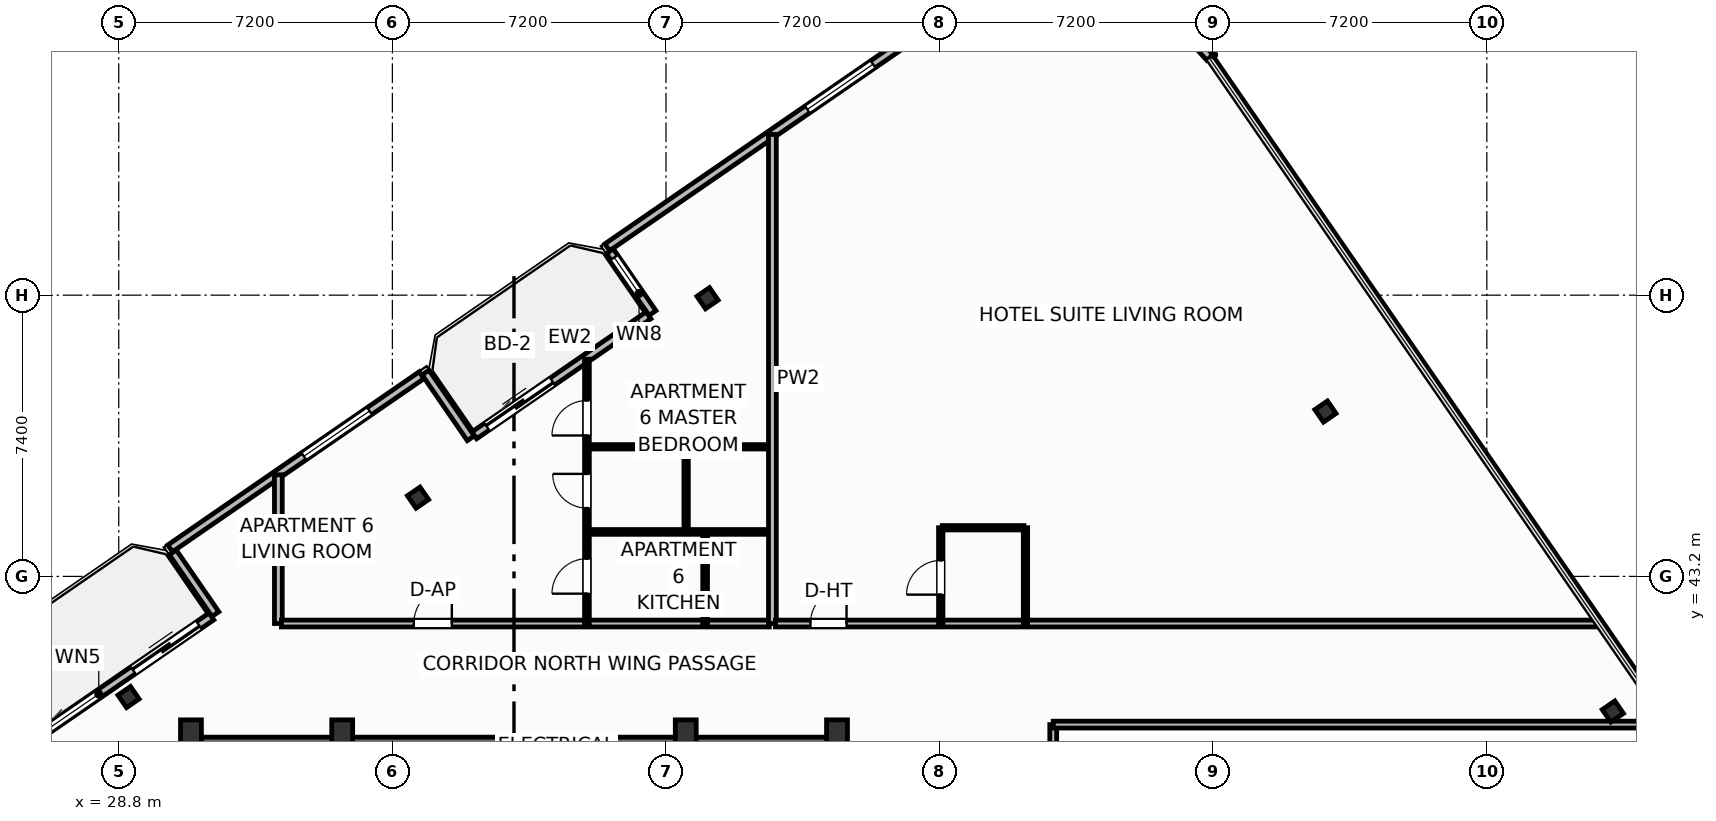
"""IFC4 building model, lengths in metres.
Left out: names, types, materials, properties, quantities, classifications, styles, units other than length and angle.
Written with IfcOpenShell. Run it as: python <this file> out.ifc"""

import sys

from ifc_helpers import new_model, si_unit, direction, frame, frame_2d, origin, origin_2d, place, context, subcontext, project, spatial, rectangle, i_section, extrude, element, fill, save


model = new_model("IFC4")
c1 = context("Model", 3, precision=1e-05, world=origin(), true_north=direction((0.0, 1.0)))
c2 = subcontext(c1, "Body", "Model", "MODEL_VIEW")
j1 = project(units=[si_unit("LENGTHUNIT", "METRE"), si_unit("PLANEANGLEUNIT", "RADIAN")], contexts=[c1])
p1 = place(None, origin())
s1 = spatial("IfcSite", under=j1, at=p1, CompositionType="ELEMENT")
p2 = place(p1, origin())
s2 = spatial("IfcBuilding", under=s1, at=p2, CompositionType="ELEMENT")
p3 = place(p2, frame((0.0, 0.0, 269.3)))
s3 = spatial("IfcBuildingStorey", under=s2, at=p3, CompositionType="ELEMENT", Elevation=269.3)
for number, where, z_axis, x_axis in (
    (1, (30.7, 39.05, 0.0), (0.0, 0.0, 1.0), (1.0, 0.0, 0.0)),
    (2, (34.68, 39.05, 0.0), (0.0, 0.0, 1.0), (1.0, 0.0, 0.0)),
    (3, (43.72, 39.05, 0.0), (0.0, 0.0, 1.0), (1.0, 0.0, 0.0)),
    (4, (47.7, 39.05, 0.0), (0.0, 0.0, 1.0), (1.0, 0.0, 0.0)),
):
    element("IfcColumn", number, at=place(p3, frame(where, z_axis=z_axis, x_axis=x_axis)), inside=s3, PredefinedType="COLUMN", context=c2, shape_type="SweptSolid", body=[
        extrude(rectangle(XDim=0.55, YDim=0.75, at=origin_2d()), origin(), (0.0, 0.0, 1.0), 3.7),
    ])
p4 = place(p3, frame((30.58, 38.695, 0.0), z_axis=(0.0, 0.0, 1.0), x_axis=(1.0, 0.0, 0.0)))
e5 = element("IfcWall", 5, at=p4, inside=s3, PredefinedType="SHEAR", context=c2, shape_type="SweptSolid", body=[
    extrude(rectangle(XDim=17.24, YDim=0.55, at=frame_2d((8.62, 0.0))), origin(), (0.0, 0.0, 1.0), 3.45),
])
for number, where, z_axis, x_axis in (
    (6, (68.115, 39.644, 0.0), (0.0, 0.0, 1.0), (0.824, 0.567, 0.0)),
    (7, (60.554, 47.537, 0.0), (0.0, 0.0, 1.0), (0.824, 0.567, 0.0)),
    (8, (44.292, 50.519, 0.0), (0.0, 0.0, 1.0), (0.824, 0.567, 0.0)),
    (9, (36.675, 45.272, 0.0), (0.0, 0.0, 1.0), (0.824, 0.567, 0.0)),
    (10, (29.057, 40.025, 0.0), (0.0, 0.0, 1.0), (0.824, 0.567, 0.0)),
):
    element("IfcColumn", number, at=place(p3, frame(where, z_axis=z_axis, x_axis=x_axis)), inside=s3, PredefinedType="COLUMN", context=c2, shape_type="SweptSolid", body=[
        extrude(i_section(OverallWidth=0.401, OverallDepth=0.399, WebThickness=0.025, FlangeThickness=0.04, FilletRadius=0.022, at=origin_2d()), origin(), (0.0, 0.0, 1.0), 3.7),
    ])
p5 = place(p3, frame((26.297, 38.743, 0.0), z_axis=(0.0, 0.0, 1.0), x_axis=(0.823534636215, 0.567265989598, 0.0)))
e11 = element("IfcWall", 11, at=p5, inside=s3, PredefinedType="SOLIDWALL", context=c2, shape_type="SweptSolid", body=[
    extrude(rectangle(XDim=6.0, YDim=0.22, at=frame_2d((3.0, 0.0))), origin(), (0.0, 0.0, 1.0), 2.73),
])
p6 = place(p5, frame((3.5, 0.0, 0.0)))
e12 = element("IfcOpeningElement", 12, at=p6, cuts=e11, PredefinedType="OPENING", context=c2, shape_type="SweptSolid", body=[
    extrude(rectangle(XDim=2.1, YDim=2.3, at=frame_2d((1.05, 1.15))), frame((0.0, 0.12, 0.0), z_axis=(0.0, -1.0, 0.0), x_axis=(1.0, 0.0, 0.0)), (0.0, 0.0, 1.0), 0.24),
])
p7 = place(p5, frame((0.55, 0.0, 0.75)))
e13 = element("IfcOpeningElement", 13, at=p7, cuts=e11, PredefinedType="OPENING", context=c2, shape_type="SweptSolid", body=[
    extrude(rectangle(XDim=1.85, YDim=1.75, at=frame_2d((0.925, 0.875))), frame((0.0, 0.12, 0.0), z_axis=(0.0, -1.0, 0.0), x_axis=(1.0, 0.0, 0.0)), (0.0, 0.0, 1.0), 0.24),
])
p8 = place(p3, frame((38.156, 46.912, 0.0), z_axis=(0.0, 0.0, 1.0), x_axis=(0.823527178548, 0.567276816195, 0.0)))
e14 = element("IfcWall", 14, at=p8, inside=s3, PredefinedType="SOLIDWALL", context=c2, shape_type="SweptSolid", body=[
    extrude(rectangle(XDim=5.567, YDim=0.22, at=frame_2d((2.783, 0.0))), origin(), (0.0, 0.0, 1.0), 2.73),
])
p9 = place(p8, frame((0.4, 0.0, 0.0)))
e15 = element("IfcOpeningElement", 15, at=p9, cuts=e14, PredefinedType="OPENING", context=c2, shape_type="SweptSolid", body=[
    extrude(rectangle(XDim=2.1, YDim=2.3, at=frame_2d((1.05, 1.15))), frame((0.0, 0.12, 0.0), z_axis=(0.0, -1.0, 0.0), x_axis=(1.0, 0.0, 0.0)), (0.0, 0.0, 1.0), 0.24),
])
p10 = place(p3, frame((57.51, 56.855, 0.0), z_axis=(0.0, 0.0, 1.0), x_axis=(-0.669853727156, 0.742493086982, 0.0)))
e16 = element("IfcWall", 16, at=p10, inside=s3, PredefinedType="SOLIDWALL", context=c2, shape_type="SweptSolid", body=[
    extrude(rectangle(XDim=1.274, YDim=0.22, at=frame_2d((0.637, 0.0))), origin(), (0.0, 0.0, 1.0), 2.73),
])
p11 = place(p3, frame((50.697, 58.087, 0.0), z_axis=(0.0, 0.0, 1.0), x_axis=(-0.823539455464, -0.567258993137, 0.0)))
e17 = element("IfcWall", 17, at=p11, inside=s3, PredefinedType="SOLIDWALL", context=c2, shape_type="SweptSolid", body=[
    extrude(rectangle(XDim=10.98, YDim=0.22, at=frame_2d((5.49, 0.0))), origin(), (0.0, 0.0, 1.0), 2.73),
])
p12 = place(p11, frame((2.486, 0.0, 0.8)))
e18 = element("IfcOpeningElement", 18, at=p12, cuts=e17, PredefinedType="OPENING", context=c2, shape_type="SweptSolid", body=[
    extrude(rectangle(XDim=2.1, YDim=1.75, at=frame_2d((1.05, 0.875))), frame((0.0, 0.12, 0.0), z_axis=(0.0, -1.0, 0.0), x_axis=(1.0, 0.0, 0.0)), (0.0, 0.0, 1.0), 0.24),
])
p13 = place(p3, frame((41.725, 51.756, 0.0), z_axis=(0.0, 0.0, 1.0), x_axis=(0.567273565974, -0.823529417415, 0.0)))
e19 = element("IfcWall", 19, at=p13, inside=s3, PredefinedType="SOLIDWALL", context=c2, shape_type="SweptSolid", body=[
    extrude(rectangle(XDim=1.975, YDim=0.22, at=frame_2d((0.988, 0.0))), origin(), (0.0, 0.0, 1.0), 2.73),
])
p14 = place(p13, frame((0.2, 0.0, 0.8)))
e20 = element("IfcOpeningElement", 20, at=p14, cuts=e19, PredefinedType="OPENING", context=c2, shape_type="SweptSolid", body=[
    extrude(rectangle(XDim=1.15, YDim=1.4, at=frame_2d((0.575, 0.7))), frame((0.0, 0.12, 0.0), z_axis=(0.0, -1.0, 0.0), x_axis=(1.0, 0.0, 0.0)), (0.0, 0.0, 1.0), 0.24),
])
p15 = place(p3, frame((38.063, 46.835, 0.0), z_axis=(0.0, 0.0, 1.0), x_axis=(-0.567219383419, 0.823566737474, 0.0)))
e21 = element("IfcWall", 21, at=p15, inside=s3, PredefinedType="SOLIDWALL", context=c2, shape_type="SweptSolid", body=[
    extrude(rectangle(XDim=2.1, YDim=0.22, at=frame_2d((1.05, 0.0))), origin(), (0.0, 0.0, 1.0), 2.73),
])
p16 = place(p3, frame((36.769, 48.494, 0.0), z_axis=(0.0, 0.0, 1.0), x_axis=(-0.823521165086, -0.56728554596, 0.0)))
e22 = element("IfcWall", 22, at=p16, inside=s3, PredefinedType="SOLIDWALL", context=c2, shape_type="SweptSolid", body=[
    extrude(rectangle(XDim=8.035, YDim=0.22, at=frame_2d((4.018, 0.0))), origin(), (0.0, 0.0, 1.0), 2.73),
])
p17 = place(p16, frame((1.662, 0.0, 0.8)))
e23 = element("IfcOpeningElement", 23, at=p17, cuts=e22, PredefinedType="OPENING", context=c2, shape_type="SweptSolid", body=[
    extrude(rectangle(XDim=2.1, YDim=1.75, at=frame_2d((1.05, 0.875))), frame((0.0, 0.12, 0.0), z_axis=(0.0, -1.0, 0.0), x_axis=(1.0, 0.0, 0.0)), (0.0, 0.0, 1.0), 0.24),
])
p18 = place(p3, frame((30.223, 43.833, 0.0), z_axis=(0.0, 0.0, 1.0), x_axis=(0.567215821234, -0.823569190865, 0.0)))
e24 = element("IfcWall", 24, at=p18, inside=s3, PredefinedType="SOLIDWALL", context=c2, shape_type="SweptSolid", body=[
    extrude(rectangle(XDim=1.975, YDim=0.22, at=frame_2d((0.988, 0.0))), origin(), (0.0, 0.0, 1.0), 2.73),
])
p19 = place(p3, frame((33.0, 41.96, 0.0), z_axis=(0.0, 0.0, 1.0), x_axis=(0.0, 1.0, 0.0)))
e25 = element("IfcWall", 25, at=p19, inside=s3, PredefinedType="PARTITIONING", context=c2, shape_type="SweptSolid", body=[
    extrude(rectangle(XDim=3.914, YDim=0.205, at=frame_2d((1.957, 0.0))), origin(), (0.0, 0.0, 1.0), 3.45),
])
p20 = place(p3, frame((33.08, 41.96, 0.0), z_axis=(0.0, 0.0, 1.0), x_axis=(1.0, 0.0, 0.0)))
e26 = element("IfcWall", 26, at=p20, inside=s3, PredefinedType="PARTITIONING", context=c2, shape_type="SweptSolid", body=[
    extrude(rectangle(XDim=12.84, YDim=0.18, at=frame_2d((6.42, 0.0))), origin(), (0.0, 0.0, 1.0), 3.45),
])
p21 = place(p20, frame((3.485, 0.0, 0.0)))
e27 = element("IfcOpeningElement", 27, at=p21, cuts=e26, PredefinedType="OPENING", context=c2, shape_type="SweptSolid", body=[
    extrude(rectangle(XDim=1.0, YDim=2.2, at=frame_2d((0.5, 1.1))), frame((0.0, 0.1, 0.0), z_axis=(0.0, -1.0, 0.0), x_axis=(1.0, 0.0, 0.0)), (0.0, 0.0, 1.0), 0.2),
])
p22 = place(p3, frame((41.12, 41.96, 0.0), z_axis=(0.0, 0.0, 1.0), x_axis=(0.0, 1.0, 0.0)))
e28 = element("IfcWall", 28, at=p22, inside=s3, PredefinedType="PARTITIONING", context=c2, shape_type="SweptSolid", body=[
    extrude(rectangle(XDim=6.957, YDim=0.125, at=frame_2d((3.479, 0.0))), origin(), (0.0, 0.0, 1.0), 3.45),
])
p23 = place(p22, frame((0.785, 0.0, 0.0)))
e29 = element("IfcOpeningElement", 29, at=p23, cuts=e28, PredefinedType="OPENING", context=c2, shape_type="SweptSolid", body=[
    extrude(rectangle(XDim=0.92, YDim=2.05, at=frame_2d((0.46, 1.025))), frame((0.0, 0.073, 0.0), z_axis=(0.0, -1.0, 0.0), x_axis=(1.0, 0.0, 0.0)), (0.0, 0.0, 1.0), 0.145),
])
p24 = place(p22, frame((3.037, 0.0, 0.0)))
e30 = element("IfcOpeningElement", 30, at=p24, cuts=e28, PredefinedType="OPENING", context=c2, shape_type="SweptSolid", body=[
    extrude(rectangle(XDim=0.9, YDim=2.05, at=frame_2d((0.45, 1.025))), frame((0.0, 0.073, 0.0), z_axis=(0.0, -1.0, 0.0), x_axis=(1.0, 0.0, 0.0)), (0.0, 0.0, 1.0), 0.145),
])
p25 = place(p22, frame((4.948, 0.0, 0.0)))
e31 = element("IfcOpeningElement", 31, at=p25, cuts=e28, PredefinedType="OPENING", context=c2, shape_type="SweptSolid", body=[
    extrude(rectangle(XDim=0.92, YDim=2.05, at=frame_2d((0.46, 1.025))), frame((0.0, 0.073, 0.0), z_axis=(0.0, -1.0, 0.0), x_axis=(1.0, 0.0, 0.0)), (0.0, 0.0, 1.0), 0.145),
])
p26 = place(p3, frame((41.19, 44.37, 0.0), z_axis=(0.0, 0.0, 1.0), x_axis=(1.0, 0.0, 0.0)))
e32 = element("IfcWall", 32, at=p26, inside=s3, PredefinedType="PARTITIONING", context=c2, shape_type="SweptSolid", body=[
    extrude(rectangle(XDim=4.73, YDim=0.125, at=frame_2d((2.365, 0.0))), origin(), (0.0, 0.0, 1.0), 3.45),
])
p27 = place(p3, frame((41.19, 46.61, 0.0), z_axis=(0.0, 0.0, 1.0), x_axis=(1.0, 0.0, 0.0)))
e33 = element("IfcWall", 33, at=p27, inside=s3, PredefinedType="PARTITIONING", context=c2, shape_type="SweptSolid", body=[
    extrude(rectangle(XDim=4.73, YDim=0.115, at=frame_2d((2.365, 0.0))), origin(), (0.0, 0.0, 1.0), 3.45),
])
p28 = place(p3, frame((44.23, 41.96, 0.0), z_axis=(0.0, 0.0, 1.0), x_axis=(0.0, 1.0, 0.0)))
e34 = element("IfcWall", 34, at=p28, inside=s3, PredefinedType="PARTITIONING", context=c2, shape_type="SweptSolid", body=[
    extrude(rectangle(XDim=2.41, YDim=0.125, at=frame_2d((1.205, 0.0))), origin(), (0.0, 0.0, 1.0), 3.45),
])
p29 = place(p3, frame((43.73, 44.37, 0.0), z_axis=(0.0, 0.0, 1.0), x_axis=(0.0, 1.0, 0.0)))
e35 = element("IfcWall", 35, at=p29, inside=s3, PredefinedType="PARTITIONING", context=c2, shape_type="SweptSolid", body=[
    extrude(rectangle(XDim=2.24, YDim=0.115, at=frame_2d((1.12, 0.0))), origin(), (0.0, 0.0, 1.0), 3.45),
])
p30 = place(p3, frame((46.0, 41.96, 0.0), z_axis=(0.0, 0.0, 1.0), x_axis=(0.0, 1.0, 0.0)))
e36 = element("IfcWall", 36, at=p30, inside=s3, PredefinedType="PARTITIONING", context=c2, shape_type="SweptSolid", body=[
    extrude(rectangle(XDim=12.868, YDim=0.205, at=frame_2d((6.434, 0.0))), origin(), (0.0, 0.0, 1.0), 3.45),
])
p31 = place(p3, frame((46.08, 41.96, 0.0), z_axis=(0.0, 0.0, 1.0), x_axis=(1.0, 0.0, 0.0)))
e37 = element("IfcWall", 37, at=p31, inside=s3, PredefinedType="PARTITIONING", context=c2, shape_type="SweptSolid", body=[
    extrude(rectangle(XDim=21.627, YDim=0.18, at=frame_2d((10.813, 0.0))), origin(), (0.0, 0.0, 1.0), 3.45),
])
p32 = place(p31, frame((0.921, 0.0, 0.0)))
e38 = element("IfcOpeningElement", 38, at=p32, cuts=e37, PredefinedType="OPENING", context=c2, shape_type="SweptSolid", body=[
    extrude(rectangle(XDim=0.95, YDim=2.15, at=frame_2d((0.475, 1.075))), frame((0.0, 0.1, 0.0), z_axis=(0.0, -1.0, 0.0), x_axis=(1.0, 0.0, 0.0)), (0.0, 0.0, 1.0), 0.2),
])
p33 = place(p3, frame((50.47, 44.48, 0.0), z_axis=(0.0, 0.0, 1.0), x_axis=(1.0, 0.0, 0.0)))
e39 = element("IfcWall", 39, at=p33, inside=s3, PredefinedType="PARTITIONING", context=c2, shape_type="SweptSolid", body=[
    extrude(rectangle(XDim=2.15, YDim=0.115, at=frame_2d((1.075, 0.0))), origin(), (0.0, 0.0, 1.0), 3.018),
])
p34 = place(p3, frame((50.43, 41.96, 0.0), z_axis=(0.0, 0.0, 1.0), x_axis=(0.0, 1.0, 0.0)))
e40 = element("IfcWall", 40, at=p34, inside=s3, PredefinedType="PARTITIONING", context=c2, shape_type="SweptSolid", body=[
    extrude(rectangle(XDim=2.52, YDim=0.115, at=frame_2d((1.26, 0.0))), origin(), (0.0, 0.0, 1.0), 3.45),
])
p35 = place(p34, frame((0.76, 0.0, 0.0)))
e41 = element("IfcOpeningElement", 41, at=p35, cuts=e40, PredefinedType="OPENING", context=c2, shape_type="SweptSolid", body=[
    extrude(rectangle(XDim=0.9, YDim=2.05, at=frame_2d((0.45, 1.025))), frame((0.0, 0.067, 0.0), z_axis=(0.0, -1.0, 0.0), x_axis=(1.0, 0.0, 0.0)), (0.0, 0.0, 1.0), 0.135),
])
p36 = place(p3, frame((52.66, 41.96, 0.0), z_axis=(0.0, 0.0, 1.0), x_axis=(0.0, 1.0, 0.0)))
e42 = element("IfcWall", 42, at=p36, inside=s3, PredefinedType="PARTITIONING", context=c2, shape_type="SweptSolid", body=[
    extrude(rectangle(XDim=2.52, YDim=0.115, at=frame_2d((1.26, 0.0))), origin(), (0.0, 0.0, 1.0), 3.45),
])
p37 = place(p3, frame((53.39, 26.84, 0.0), z_axis=(0.0, 0.0, 1.0), x_axis=(0.0, 1.0, 0.0)))
e43 = element("IfcWall", 43, at=p37, inside=s3, PredefinedType="PARTITIONING", context=c2, shape_type="SweptSolid", body=[
    extrude(rectangle(XDim=12.46, YDim=0.18, at=frame_2d((6.23, 0.0))), origin(), (0.0, 0.0, 1.0), 3.45),
])
p38 = place(p37, frame((0.618, 0.0, 0.0)))
e44 = element("IfcOpeningElement", 44, at=p38, cuts=e43, PredefinedType="OPENING", context=c2, shape_type="SweptSolid", body=[
    extrude(rectangle(XDim=0.92, YDim=2.05, at=frame_2d((0.46, 1.025))), frame((0.0, 0.1, 0.0), z_axis=(0.0, -1.0, 0.0), x_axis=(1.0, 0.0, 0.0)), (0.0, 0.0, 1.0), 0.2),
])
p39 = place(p3, frame((53.39, 39.3, 0.0), z_axis=(0.0, 0.0, 1.0), x_axis=(1.0, 0.0, 0.0)))
e45 = element("IfcWall", 45, at=p39, inside=s3, PredefinedType="PARTITIONING", context=c2, shape_type="SweptSolid", body=[
    extrude(rectangle(XDim=16.149, YDim=0.18, at=frame_2d((8.075, 0.0))), origin(), (0.0, 0.0, 1.0), 2.739),
])
p40 = place(p6, origin())
e46 = element("IfcDoor", 46, at=p40, inside=s3, OperationType="SLIDING_TO_LEFT", PredefinedType="DOOR", context=c2, shape_type="SweptSolid", body=[
    extrude(rectangle(XDim=2.1, YDim=2.3, at=frame_2d((1.05, 1.15))), frame((0.0, 0.025, 0.0), z_axis=(0.0, -1.0, 0.0), x_axis=(1.0, 0.0, 0.0)), (0.0, 0.0, 1.0), 0.05),
])
fill(e12, e46)
p41 = place(p7, origin())
e47 = element("IfcWindow", 47, at=p41, inside=s3, PartitioningType="SINGLE_PANEL", PredefinedType="WINDOW", context=c2, shape_type="SweptSolid", body=[
    extrude(rectangle(XDim=1.85, YDim=1.75, at=frame_2d((0.925, 0.875))), frame((0.0, 0.03, 0.0), z_axis=(0.0, -1.0, 0.0), x_axis=(1.0, 0.0, 0.0)), (0.0, 0.0, 1.0), 0.06),
])
fill(e13, e47)
p42 = place(p9, origin())
e48 = element("IfcDoor", 48, at=p42, inside=s3, OperationType="SLIDING_TO_LEFT", PredefinedType="DOOR", context=c2, shape_type="SweptSolid", body=[
    extrude(rectangle(XDim=2.1, YDim=2.3, at=frame_2d((1.05, 1.15))), frame((0.0, 0.025, 0.0), z_axis=(0.0, -1.0, 0.0), x_axis=(1.0, 0.0, 0.0)), (0.0, 0.0, 1.0), 0.05),
])
fill(e15, e48)
p43 = place(p12, origin())
e49 = element("IfcWindow", 49, at=p43, inside=s3, PartitioningType="SINGLE_PANEL", PredefinedType="WINDOW", context=c2, shape_type="SweptSolid", body=[
    extrude(rectangle(XDim=2.1, YDim=1.75, at=frame_2d((1.05, 0.875))), frame((0.0, 0.03, 0.0), z_axis=(0.0, -1.0, 0.0), x_axis=(1.0, 0.0, 0.0)), (0.0, 0.0, 1.0), 0.06),
])
fill(e18, e49)
p44 = place(p17, origin())
e50 = element("IfcWindow", 50, at=p44, inside=s3, PartitioningType="SINGLE_PANEL", PredefinedType="WINDOW", context=c2, shape_type="SweptSolid", body=[
    extrude(rectangle(XDim=2.1, YDim=1.75, at=frame_2d((1.05, 0.875))), frame((0.0, 0.03, 0.0), z_axis=(0.0, -1.0, 0.0), x_axis=(1.0, 0.0, 0.0)), (0.0, 0.0, 1.0), 0.06),
])
fill(e23, e50)
p45 = place(p21, origin())
e51 = element("IfcDoor", 51, at=p45, inside=s3, OperationType="SINGLE_SWING_RIGHT", PredefinedType="DOOR", context=c2, shape_type="SweptSolid", body=[
    extrude(rectangle(XDim=1.0, YDim=2.2, at=frame_2d((0.5, 1.1))), frame((0.0, 0.025, 0.0), z_axis=(0.0, -1.0, 0.0), x_axis=(1.0, 0.0, 0.0)), (0.0, 0.0, 1.0), 0.05),
])
fill(e27, e51)
p46 = place(p23, origin())
e52 = element("IfcDoor", 52, at=p46, inside=s3, OperationType="SINGLE_SWING_LEFT", PredefinedType="DOOR", context=c2, shape_type="SweptSolid", body=[
    extrude(rectangle(XDim=0.92, YDim=2.05, at=frame_2d((0.46, 1.025))), frame((0.0, 0.025, 0.0), z_axis=(0.0, -1.0, 0.0), x_axis=(1.0, 0.0, 0.0)), (0.0, 0.0, 1.0), 0.05),
])
fill(e29, e52)
p47 = place(p24, origin())
e53 = element("IfcDoor", 53, at=p47, inside=s3, OperationType="SINGLE_SWING_RIGHT", PredefinedType="DOOR", context=c2, shape_type="SweptSolid", body=[
    extrude(rectangle(XDim=0.9, YDim=2.05, at=frame_2d((0.45, 1.025))), frame((0.0, 0.025, 0.0), z_axis=(0.0, -1.0, 0.0), x_axis=(1.0, 0.0, 0.0)), (0.0, 0.0, 1.0), 0.05),
])
fill(e30, e53)
p48 = place(p25, origin())
e54 = element("IfcDoor", 54, at=p48, inside=s3, OperationType="SINGLE_SWING_LEFT", PredefinedType="DOOR", context=c2, shape_type="SweptSolid", body=[
    extrude(rectangle(XDim=0.92, YDim=2.05, at=frame_2d((0.46, 1.025))), frame((0.0, 0.025, 0.0), z_axis=(0.0, -1.0, 0.0), x_axis=(1.0, 0.0, 0.0)), (0.0, 0.0, 1.0), 0.05),
])
fill(e31, e54)
p49 = place(p32, origin())
e55 = element("IfcDoor", 55, at=p49, inside=s3, OperationType="SINGLE_SWING_RIGHT", PredefinedType="DOOR", context=c2, shape_type="SweptSolid", body=[
    extrude(rectangle(XDim=0.95, YDim=2.15, at=frame_2d((0.475, 1.075))), frame((0.0, 0.025, 0.0), z_axis=(0.0, -1.0, 0.0), x_axis=(1.0, 0.0, 0.0)), (0.0, 0.0, 1.0), 0.05),
])
fill(e38, e55)
p50 = place(p35, origin())
e56 = element("IfcDoor", 56, at=p50, inside=s3, OperationType="SINGLE_SWING_LEFT", PredefinedType="DOOR", context=c2, shape_type="SweptSolid", body=[
    extrude(rectangle(XDim=0.9, YDim=2.05, at=frame_2d((0.45, 1.025))), frame((0.0, 0.025, 0.0), z_axis=(0.0, -1.0, 0.0), x_axis=(1.0, 0.0, 0.0)), (0.0, 0.0, 1.0), 0.05),
])
fill(e41, e56)
p51 = place(p14, origin())
e57 = element("IfcWindow", 57, at=p51, inside=s3, PartitioningType="SINGLE_PANEL", PredefinedType="WINDOW", context=c2, shape_type="SweptSolid", body=[
    extrude(rectangle(XDim=1.15, YDim=1.4, at=frame_2d((0.575, 0.7))), frame((0.0, 0.03, 0.0), z_axis=(0.0, -1.0, 0.0), x_axis=(1.0, 0.0, 0.0)), (0.0, 0.0, 1.0), 0.06),
])
fill(e20, e57)
save(model, sys.argv[1])
